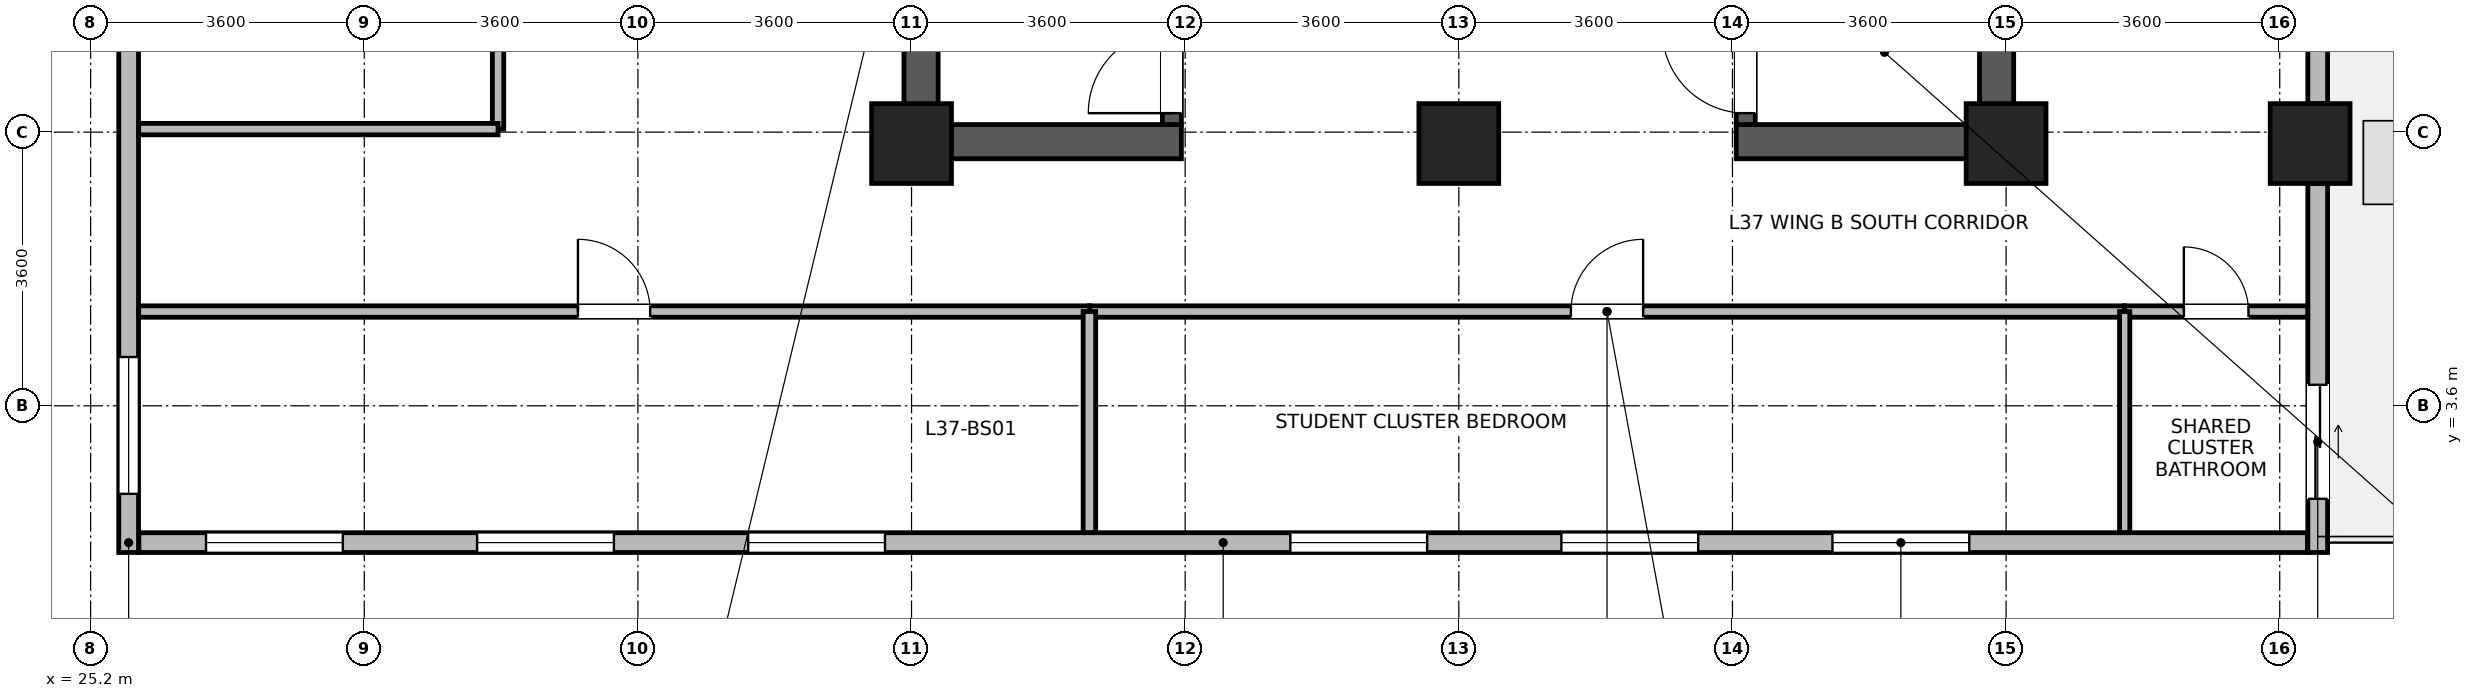
"""IFC4 building model, lengths in metres.
Left out: names, types, materials, properties, quantities, classifications, styles, units other than length and angle.
Written with IfcOpenShell. Run it as: python <this file> out.ifc"""

import sys

from ifc_helpers import new_model, si_unit, direction, frame, frame_2d, origin, origin_2d, place, context, subcontext, project, spatial, rectangle, extrude, source, transform, mapped, element, fill, save


model = new_model("IFC4")
c1 = context("Model", 3, precision=1e-05, world=origin(), true_north=direction((0.0, 1.0)))
c2 = subcontext(c1, "Body", "Model", "MODEL_VIEW")
j1 = project(units=[si_unit("LENGTHUNIT", "METRE"), si_unit("PLANEANGLEUNIT", "RADIAN")], contexts=[c1])
p1 = place(None, origin())
s1 = spatial("IfcSite", under=j1, at=p1, CompositionType="ELEMENT")
p2 = place(p1, origin())
s2 = spatial("IfcBuilding", under=s1, at=p2, CompositionType="ELEMENT")
p3 = place(p2, frame((0.0, 0.0, 147.6)))
s3 = spatial("IfcBuildingStorey", under=s2, at=p3, CompositionType="ELEMENT", Elevation=147.6)
for number, where, z_axis, x_axis in (
    (1, (36.125, 6.85, 0.0), (0.0, 0.0, 1.0), (0.0, 1.0, 0.0)),
    (2, (50.275, 6.85, 0.0), (0.0, 0.0, 1.0), (0.0, 1.0, 0.0)),
):
    element("IfcWall", number, at=place(p3, frame(where, z_axis=z_axis, x_axis=x_axis)), inside=s3, PredefinedType="SHEAR", context=c2, shape_type="SweptSolid", body=[
        extrude(rectangle(XDim=7.9, YDim=0.45, at=frame_2d((3.95, 0.0))), origin(), (0.0, 0.0, 1.0), 3.46),
    ])
for number, where, z_axis, x_axis in (
    (3, (36.35, 7.075, 0.0), (0.0, 0.0, 1.0), (1.0, 0.0, 0.0)),
    (4, (46.85, 7.075, 0.0), (0.0, 0.0, 1.0), (1.0, 0.0, 0.0)),
):
    element("IfcWall", number, at=place(p3, frame(where, z_axis=z_axis, x_axis=x_axis)), inside=s3, PredefinedType="SHEAR", context=c2, shape_type="SweptSolid", body=[
        extrude(rectangle(XDim=3.2, YDim=0.45, at=frame_2d((1.6, 0.0))), origin(), (0.0, 0.0, 1.0), 3.46),
    ])
p4 = place(p3, frame((39.425, 7.3, 0.0), z_axis=(0.0, 0.0, 1.0), x_axis=(0.0, 1.0, 0.0)))
e5 = element("IfcWall", 5, at=p4, inside=s3, PredefinedType="SHEAR", context=c2, shape_type="SweptSolid", body=[
    extrude(rectangle(XDim=7.0, YDim=0.25, at=frame_2d((3.5, 0.0))), origin(), (0.0, 0.0, 1.0), 3.46),
])
p5 = place(p4, frame((0.15, 0.0, 0.0)))
e6 = element("IfcOpeningElement", 6, at=p5, cuts=e5, PredefinedType="OPENING", context=c2, shape_type="SweptSolid", body=[
    extrude(rectangle(XDim=1.1, YDim=2.08, at=frame_2d((0.55, 1.04))), frame((0.0, 0.135, 0.0), z_axis=(0.0, -1.0, 0.0), x_axis=(1.0, 0.0, 0.0)), (0.0, 0.0, 1.0), 0.27),
])
p6 = place(p3, frame((46.975, 7.3, 0.0), z_axis=(0.0, 0.0, 1.0), x_axis=(0.0, 1.0, 0.0)))
e7 = element("IfcWall", 7, at=p6, inside=s3, PredefinedType="SHEAR", context=c2, shape_type="SweptSolid", body=[
    extrude(rectangle(XDim=7.0, YDim=0.25, at=frame_2d((3.5, 0.0))), origin(), (0.0, 0.0, 1.0), 3.46),
])
p7 = place(p6, frame((0.15, 0.0, 0.0)))
e8 = element("IfcOpeningElement", 8, at=p7, cuts=e7, PredefinedType="OPENING", context=c2, shape_type="SweptSolid", body=[
    extrude(rectangle(XDim=1.1, YDim=2.08, at=frame_2d((0.55, 1.04))), frame((0.0, 0.135, 0.0), z_axis=(0.0, -1.0, 0.0), x_axis=(1.0, 0.0, 0.0)), (0.0, 0.0, 1.0), 0.27),
])
m1 = source(origin(), c2, "Body", "SweptSolid", [
    extrude(rectangle(XDim=1.05, YDim=1.05, at=origin_2d()), origin(), (0.0, 0.0, 1.0), 3.7),
])
for number, where, z_axis, x_axis in (
    (9, (36.0, 7.05, 0.0), (0.0, 0.0, 1.0), (1.0, 0.0, 0.0)),
    (10, (43.2, 7.05, 0.0), (0.0, 0.0, 1.0), (1.0, 0.0, 0.0)),
    (11, (50.4, 7.05, 0.0), (0.0, 0.0, 1.0), (1.0, 0.0, 0.0)),
    (12, (54.4, 7.05, 0.0), (0.0, 0.0, 1.0), (1.0, 0.0, 0.0)),
):
    element("IfcColumn", number, at=place(p3, frame(where, z_axis=z_axis, x_axis=x_axis)), inside=s3, PredefinedType="COLUMN", context=c2, shape_type="MappedRepresentation", body=[
        mapped(m1, transform((0.0, 0.0, 0.0), x_axis=(1.0, 0.0, 0.0), y_axis=(0.0, 1.0, 0.0), z_axis=(0.0, 0.0, 1.0), scale=1.0)),
    ])
p8 = place(p3, frame((54.365, 1.8, 0.0), z_axis=(0.0, 0.0, 1.0), x_axis=(-1.0, 0.0, 0.0)))
e13 = element("IfcWall", 13, at=p8, inside=s3, PredefinedType="STANDARD", context=c2, shape_type="SweptSolid", body=[
    extrude(rectangle(XDim=28.53, YDim=0.26, at=frame_2d((14.265, 0.0))), origin(), (0.0, 0.0, 1.0), 3.44),
])
p9 = place(p8, frame((4.449, 0.0, 0.85)))
e14 = element("IfcOpeningElement", 14, at=p9, cuts=e13, PredefinedType="OPENING", context=c2, shape_type="SweptSolid", body=[
    extrude(rectangle(XDim=1.8, YDim=1.85, at=frame_2d((0.9, 0.925))), frame((0.0, 0.14, 0.0), z_axis=(0.0, -1.0, 0.0), x_axis=(1.0, 0.0, 0.0)), (0.0, 0.0, 1.0), 0.28),
])
p10 = place(p8, frame((8.016, 0.0, 0.85)))
e15 = element("IfcOpeningElement", 15, at=p10, cuts=e13, PredefinedType="OPENING", context=c2, shape_type="SweptSolid", body=[
    extrude(rectangle(XDim=1.8, YDim=1.85, at=frame_2d((0.9, 0.925))), frame((0.0, 0.14, 0.0), z_axis=(0.0, -1.0, 0.0), x_axis=(1.0, 0.0, 0.0)), (0.0, 0.0, 1.0), 0.28),
])
p11 = place(p8, frame((11.582, 0.0, 0.85)))
e16 = element("IfcOpeningElement", 16, at=p11, cuts=e13, PredefinedType="OPENING", context=c2, shape_type="SweptSolid", body=[
    extrude(rectangle(XDim=1.8, YDim=1.85, at=frame_2d((0.9, 0.925))), frame((0.0, 0.14, 0.0), z_axis=(0.0, -1.0, 0.0), x_axis=(1.0, 0.0, 0.0)), (0.0, 0.0, 1.0), 0.28),
])
p12 = place(p8, frame((18.714, 0.0, 0.85)))
e17 = element("IfcOpeningElement", 17, at=p12, cuts=e13, PredefinedType="OPENING", context=c2, shape_type="SweptSolid", body=[
    extrude(rectangle(XDim=1.8, YDim=1.85, at=frame_2d((0.9, 0.925))), frame((0.0, 0.14, 0.0), z_axis=(0.0, -1.0, 0.0), x_axis=(1.0, 0.0, 0.0)), (0.0, 0.0, 1.0), 0.28),
])
p13 = place(p8, frame((22.281, 0.0, 0.85)))
e18 = element("IfcOpeningElement", 18, at=p13, cuts=e13, PredefinedType="OPENING", context=c2, shape_type="SweptSolid", body=[
    extrude(rectangle(XDim=1.8, YDim=1.85, at=frame_2d((0.9, 0.925))), frame((0.0, 0.14, 0.0), z_axis=(0.0, -1.0, 0.0), x_axis=(1.0, 0.0, 0.0)), (0.0, 0.0, 1.0), 0.28),
])
p14 = place(p8, frame((25.847, 0.0, 0.85)))
e19 = element("IfcOpeningElement", 19, at=p14, cuts=e13, PredefinedType="OPENING", context=c2, shape_type="SweptSolid", body=[
    extrude(rectangle(XDim=1.8, YDim=1.85, at=frame_2d((0.9, 0.925))), frame((0.0, 0.14, 0.0), z_axis=(0.0, -1.0, 0.0), x_axis=(1.0, 0.0, 0.0)), (0.0, 0.0, 1.0), 0.28),
])
p15 = place(p3, frame((54.5, 6.524, 0.0), z_axis=(0.0, 0.0, 1.0), x_axis=(0.0, -1.0, 0.0)))
e20 = element("IfcWall", 20, at=p15, inside=s3, PredefinedType="STANDARD", context=c2, shape_type="SweptSolid", body=[
    extrude(rectangle(XDim=4.854, YDim=0.26, at=frame_2d((2.427, 0.0))), origin(), (0.0, 0.0, 1.0), 3.44),
])
p16 = place(p15, frame((2.648, 0.0, 0.0)))
e21 = element("IfcOpeningElement", 21, at=p16, cuts=e20, PredefinedType="OPENING", context=c2, shape_type="SweptSolid", body=[
    extrude(rectangle(XDim=1.5, YDim=2.15, at=frame_2d((0.75, 1.075))), frame((0.0, 0.14, 0.0), z_axis=(0.0, -1.0, 0.0), x_axis=(1.0, 0.0, 0.0)), (0.0, 0.0, 1.0), 0.28),
])
p17 = place(p3, frame((54.5, 14.024, 0.0), z_axis=(0.0, 0.0, 1.0), x_axis=(0.0, -1.0, 0.0)))
e22 = element("IfcWall", 22, at=p17, inside=s3, PredefinedType="STANDARD", context=c2, shape_type="SweptSolid", body=[
    extrude(rectangle(XDim=6.448, YDim=0.26, at=frame_2d((3.224, 0.0))), origin(), (0.0, 0.0, 1.0), 2.99),
])
p18 = place(p17, frame((3.936, 0.0, 0.85)))
e23 = element("IfcOpeningElement", 23, at=p18, cuts=e22, PredefinedType="OPENING", context=c2, shape_type="SweptSolid", body=[
    extrude(rectangle(XDim=1.8, YDim=1.85, at=frame_2d((0.9, 0.925))), frame((0.0, 0.14, 0.0), z_axis=(0.0, -1.0, 0.0), x_axis=(1.0, 0.0, 0.0)), (0.0, 0.0, 1.0), 0.28),
])
p19 = place(p17, frame((1.15, 0.0, 0.85)))
e24 = element("IfcOpeningElement", 24, at=p19, cuts=e22, PredefinedType="OPENING", context=c2, shape_type="SweptSolid", body=[
    extrude(rectangle(XDim=0.95, YDim=1.75, at=frame_2d((0.475, 0.875))), frame((0.0, 0.14, 0.0), z_axis=(0.0, -1.0, 0.0), x_axis=(1.0, 0.0, 0.0)), (0.0, 0.0, 1.0), 0.28),
])
p20 = place(p3, frame((25.7, 1.67, 0.0), z_axis=(0.0, 0.0, 1.0), x_axis=(0.0, 1.0, 0.0)))
e25 = element("IfcWall", 25, at=p20, inside=s3, PredefinedType="STANDARD", context=c2, shape_type="SweptSolid", body=[
    extrude(rectangle(XDim=20.06, YDim=0.26, at=frame_2d((10.03, 0.0))), origin(), (0.0, 0.0, 1.0), 3.44),
])
p21 = place(p20, frame((0.772, 0.0, 0.85)))
e26 = element("IfcOpeningElement", 26, at=p21, cuts=e25, PredefinedType="OPENING", context=c2, shape_type="SweptSolid", body=[
    extrude(rectangle(XDim=1.8, YDim=1.85, at=frame_2d((0.9, 0.925))), frame((0.0, 0.14, 0.0), z_axis=(0.0, -1.0, 0.0), x_axis=(1.0, 0.0, 0.0)), (0.0, 0.0, 1.0), 0.28),
])
p22 = place(p20, frame((7.458, 0.0, 0.85)))
e27 = element("IfcOpeningElement", 27, at=p22, cuts=e25, PredefinedType="OPENING", context=c2, shape_type="SweptSolid", body=[
    extrude(rectangle(XDim=1.8, YDim=1.85, at=frame_2d((0.9, 0.925))), frame((0.0, 0.14, 0.0), z_axis=(0.0, -1.0, 0.0), x_axis=(1.0, 0.0, 0.0)), (0.0, 0.0, 1.0), 0.28),
])
p23 = place(p20, frame((14.145, 0.0, 0.85)))
e28 = element("IfcOpeningElement", 28, at=p23, cuts=e25, PredefinedType="OPENING", context=c2, shape_type="SweptSolid", body=[
    extrude(rectangle(XDim=1.8, YDim=1.85, at=frame_2d((0.9, 0.925))), frame((0.0, 0.14, 0.0), z_axis=(0.0, -1.0, 0.0), x_axis=(1.0, 0.0, 0.0)), (0.0, 0.0, 1.0), 0.28),
])
p24 = place(p20, frame((17.488, 0.0, 0.85)))
e29 = element("IfcOpeningElement", 29, at=p24, cuts=e25, PredefinedType="OPENING", context=c2, shape_type="SweptSolid", body=[
    extrude(rectangle(XDim=1.8, YDim=1.85, at=frame_2d((0.9, 0.925))), frame((0.0, 0.14, 0.0), z_axis=(0.0, -1.0, 0.0), x_axis=(1.0, 0.0, 0.0)), (0.0, 0.0, 1.0), 0.28),
])
p25 = place(p3, frame((38.34, 4.84, 0.0), z_axis=(0.0, 0.0, 1.0), x_axis=(1.0, 0.0, 0.0)))
e30 = element("IfcWall", 30, at=p25, inside=s3, PredefinedType="PARTITIONING", context=c2, shape_type="SweptSolid", body=[
    extrude(rectangle(XDim=13.62, YDim=0.15, at=frame_2d((6.81, 0.0))), origin(), (0.0, 0.0, 1.0), 3.44),
])
p26 = place(p25, frame((6.335, 0.0, 0.0)))
e31 = element("IfcOpeningElement", 31, at=p26, cuts=e30, PredefinedType="OPENING", context=c2, shape_type="SweptSolid", body=[
    extrude(rectangle(XDim=0.95, YDim=2.1, at=frame_2d((0.475, 1.05))), frame((0.0, 0.085, 0.0), z_axis=(0.0, -1.0, 0.0), x_axis=(1.0, 0.0, 0.0)), (0.0, 0.0, 1.0), 0.17),
])
p27 = place(p3, frame((25.832, 4.84, 0.0), z_axis=(0.0, 0.0, 1.0), x_axis=(1.0, 0.0, 0.0)))
e32 = element("IfcWall", 32, at=p27, inside=s3, PredefinedType="PARTITIONING", context=c2, shape_type="SweptSolid", body=[
    extrude(rectangle(XDim=12.508, YDim=0.15, at=frame_2d((6.254, 0.0))), origin(), (0.0, 0.0, 1.0), 3.44),
])
p28 = place(p27, frame((5.779, 0.0, 0.0)))
e33 = element("IfcOpeningElement", 33, at=p28, cuts=e32, PredefinedType="OPENING", context=c2, shape_type="SweptSolid", body=[
    extrude(rectangle(XDim=0.95, YDim=2.1, at=frame_2d((0.475, 1.05))), frame((0.0, 0.085, 0.0), z_axis=(0.0, -1.0, 0.0), x_axis=(1.0, 0.0, 0.0)), (0.0, 0.0, 1.0), 0.17),
])
p29 = place(p3, frame((30.56, 7.24, 0.0), z_axis=(0.0, 0.0, 1.0), x_axis=(0.0, 1.0, 0.0)))
e34 = element("IfcWall", 34, at=p29, inside=s3, PredefinedType="PARTITIONING", context=c2, shape_type="SweptSolid", body=[
    extrude(rectangle(XDim=7.26, YDim=0.15, at=frame_2d((3.63, 0.0))), origin(), (0.0, 0.0, 1.0), 3.44),
])
p30 = place(p29, frame((2.98, 0.0, 0.0)))
e35 = element("IfcOpeningElement", 35, at=p30, cuts=e34, PredefinedType="OPENING", context=c2, shape_type="SweptSolid", body=[
    extrude(rectangle(XDim=1.3, YDim=2.12, at=frame_2d((0.65, 1.06))), frame((0.0, 0.085, 0.0), z_axis=(0.0, -1.0, 0.0), x_axis=(1.0, 0.0, 0.0)), (0.0, 0.0, 1.0), 0.17),
])
p31 = place(p3, frame((25.832, 7.24, 0.0), z_axis=(0.0, 0.0, 1.0), x_axis=(1.0, 0.0, 0.0)))
e36 = element("IfcWall", 36, at=p31, inside=s3, PredefinedType="PARTITIONING", context=c2, shape_type="SweptSolid", body=[
    extrude(rectangle(XDim=4.728, YDim=0.15, at=frame_2d((2.364, 0.0))), origin(), (0.0, 0.0, 1.0), 3.44),
])
p32 = place(p3, frame((51.96, 4.84, 0.0), z_axis=(0.0, 0.0, 1.0), x_axis=(1.0, 0.0, 0.0)))
e37 = element("IfcWall", 37, at=p32, inside=s3, PredefinedType="PARTITIONING", context=c2, shape_type="SweptSolid", body=[
    extrude(rectangle(XDim=2.408, YDim=0.15, at=frame_2d((1.204, 0.0))), origin(), (0.0, 0.0, 1.0), 3.44),
])
p33 = place(p32, frame((0.779, 0.0, 0.0)))
e38 = element("IfcOpeningElement", 38, at=p33, cuts=e37, PredefinedType="OPENING", context=c2, shape_type="SweptSolid", body=[
    extrude(rectangle(XDim=0.85, YDim=2.04, at=frame_2d((0.425, 1.02))), frame((0.0, 0.085, 0.0), z_axis=(0.0, -1.0, 0.0), x_axis=(1.0, 0.0, 0.0)), (0.0, 0.0, 1.0), 0.17),
])
p34 = place(p3, frame((38.34, 1.932, 0.0), z_axis=(0.0, 0.0, 1.0), x_axis=(0.0, 1.0, 0.0)))
e39 = element("IfcWall", 39, at=p34, inside=s3, PredefinedType="PARTITIONING", context=c2, shape_type="SweptSolid", body=[
    extrude(rectangle(XDim=2.908, YDim=0.165, at=frame_2d((1.454, 0.0))), origin(), (0.0, 0.0, 1.0), 3.44),
])
p35 = place(p3, frame((51.96, 1.932, 0.0), z_axis=(0.0, 0.0, 1.0), x_axis=(0.0, 1.0, 0.0)))
e40 = element("IfcWall", 40, at=p35, inside=s3, PredefinedType="PARTITIONING", context=c2, shape_type="SweptSolid", body=[
    extrude(rectangle(XDim=2.908, YDim=0.135, at=frame_2d((1.454, 0.0))), origin(), (0.0, 0.0, 1.0), 3.44),
])
p36 = place(p9, origin())
e41 = element("IfcWindow", 41, at=p36, inside=s3, PartitioningType="SINGLE_PANEL", PredefinedType="WINDOW", context=c2, shape_type="SweptSolid", body=[
    extrude(rectangle(XDim=1.8, YDim=1.85, at=frame_2d((0.9, 0.925))), frame((0.0, 0.03, 0.0), z_axis=(0.0, -1.0, 0.0), x_axis=(1.0, 0.0, 0.0)), (0.0, 0.0, 1.0), 0.06),
])
fill(e14, e41)
p37 = place(p10, origin())
e42 = element("IfcWindow", 42, at=p37, inside=s3, PartitioningType="SINGLE_PANEL", PredefinedType="WINDOW", context=c2, shape_type="SweptSolid", body=[
    extrude(rectangle(XDim=1.8, YDim=1.85, at=frame_2d((0.9, 0.925))), frame((0.0, 0.03, 0.0), z_axis=(0.0, -1.0, 0.0), x_axis=(1.0, 0.0, 0.0)), (0.0, 0.0, 1.0), 0.06),
])
fill(e15, e42)
p38 = place(p11, origin())
e43 = element("IfcWindow", 43, at=p38, inside=s3, PartitioningType="SINGLE_PANEL", PredefinedType="WINDOW", context=c2, shape_type="SweptSolid", body=[
    extrude(rectangle(XDim=1.8, YDim=1.85, at=frame_2d((0.9, 0.925))), frame((0.0, 0.03, 0.0), z_axis=(0.0, -1.0, 0.0), x_axis=(1.0, 0.0, 0.0)), (0.0, 0.0, 1.0), 0.06),
])
fill(e16, e43)
p39 = place(p12, origin())
e44 = element("IfcWindow", 44, at=p39, inside=s3, PartitioningType="SINGLE_PANEL", PredefinedType="WINDOW", context=c2, shape_type="SweptSolid", body=[
    extrude(rectangle(XDim=1.8, YDim=1.85, at=frame_2d((0.9, 0.925))), frame((0.0, 0.03, 0.0), z_axis=(0.0, -1.0, 0.0), x_axis=(1.0, 0.0, 0.0)), (0.0, 0.0, 1.0), 0.06),
])
fill(e17, e44)
p40 = place(p13, origin())
e45 = element("IfcWindow", 45, at=p40, inside=s3, PartitioningType="SINGLE_PANEL", PredefinedType="WINDOW", context=c2, shape_type="SweptSolid", body=[
    extrude(rectangle(XDim=1.8, YDim=1.85, at=frame_2d((0.9, 0.925))), frame((0.0, 0.03, 0.0), z_axis=(0.0, -1.0, 0.0), x_axis=(1.0, 0.0, 0.0)), (0.0, 0.0, 1.0), 0.06),
])
fill(e18, e45)
p41 = place(p14, origin())
e46 = element("IfcWindow", 46, at=p41, inside=s3, PartitioningType="SINGLE_PANEL", PredefinedType="WINDOW", context=c2, shape_type="SweptSolid", body=[
    extrude(rectangle(XDim=1.8, YDim=1.85, at=frame_2d((0.9, 0.925))), frame((0.0, 0.03, 0.0), z_axis=(0.0, -1.0, 0.0), x_axis=(1.0, 0.0, 0.0)), (0.0, 0.0, 1.0), 0.06),
])
fill(e19, e46)
p42 = place(p16, origin())
e47 = element("IfcDoor", 47, at=p42, inside=s3, OperationType="SLIDING_TO_LEFT", PredefinedType="DOOR", context=c2, shape_type="SweptSolid", body=[
    extrude(rectangle(XDim=1.5, YDim=2.15, at=frame_2d((0.75, 1.075))), frame((0.0, 0.025, 0.0), z_axis=(0.0, -1.0, 0.0), x_axis=(1.0, 0.0, 0.0)), (0.0, 0.0, 1.0), 0.05),
])
fill(e21, e47)
p43 = place(p21, origin())
e48 = element("IfcWindow", 48, at=p43, inside=s3, PartitioningType="SINGLE_PANEL", PredefinedType="WINDOW", context=c2, shape_type="SweptSolid", body=[
    extrude(rectangle(XDim=1.8, YDim=1.85, at=frame_2d((0.9, 0.925))), frame((0.0, 0.03, 0.0), z_axis=(0.0, -1.0, 0.0), x_axis=(1.0, 0.0, 0.0)), (0.0, 0.0, 1.0), 0.06),
])
fill(e26, e48)
p44 = place(p5, origin())
e49 = element("IfcDoor", 49, at=p44, inside=s3, OperationType="SINGLE_SWING_LEFT", PredefinedType="DOOR", context=c2, shape_type="SweptSolid", body=[
    extrude(rectangle(XDim=1.1, YDim=2.08, at=frame_2d((0.55, 1.04))), frame((0.0, 0.025, 0.0), z_axis=(0.0, -1.0, 0.0), x_axis=(1.0, 0.0, 0.0)), (0.0, 0.0, 1.0), 0.05),
])
fill(e6, e49)
p45 = place(p7, origin())
e50 = element("IfcDoor", 50, at=p45, inside=s3, OperationType="SINGLE_SWING_RIGHT", PredefinedType="DOOR", context=c2, shape_type="SweptSolid", body=[
    extrude(rectangle(XDim=1.1, YDim=2.08, at=frame_2d((0.55, 1.04))), frame((0.0, 0.025, 0.0), z_axis=(0.0, -1.0, 0.0), x_axis=(1.0, 0.0, 0.0)), (0.0, 0.0, 1.0), 0.05),
])
fill(e8, e50)
p46 = place(p26, origin())
e51 = element("IfcDoor", 51, at=p46, inside=s3, OperationType="SINGLE_SWING_RIGHT", PredefinedType="DOOR", context=c2, shape_type="SweptSolid", body=[
    extrude(rectangle(XDim=0.95, YDim=2.1, at=frame_2d((0.475, 1.05))), frame((0.0, 0.025, 0.0), z_axis=(0.0, -1.0, 0.0), x_axis=(1.0, 0.0, 0.0)), (0.0, 0.0, 1.0), 0.05),
])
fill(e31, e51)
p47 = place(p28, origin())
e52 = element("IfcDoor", 52, at=p47, inside=s3, OperationType="SINGLE_SWING_LEFT", PredefinedType="DOOR", context=c2, shape_type="SweptSolid", body=[
    extrude(rectangle(XDim=0.95, YDim=2.1, at=frame_2d((0.475, 1.05))), frame((0.0, 0.025, 0.0), z_axis=(0.0, -1.0, 0.0), x_axis=(1.0, 0.0, 0.0)), (0.0, 0.0, 1.0), 0.05),
])
fill(e33, e52)
p48 = place(p33, origin())
e53 = element("IfcDoor", 53, at=p48, inside=s3, OperationType="SINGLE_SWING_LEFT", PredefinedType="DOOR", context=c2, shape_type="SweptSolid", body=[
    extrude(rectangle(XDim=0.85, YDim=2.04, at=frame_2d((0.425, 1.02))), frame((0.0, 0.025, 0.0), z_axis=(0.0, -1.0, 0.0), x_axis=(1.0, 0.0, 0.0)), (0.0, 0.0, 1.0), 0.05),
])
fill(e38, e53)
save(model, sys.argv[1])
